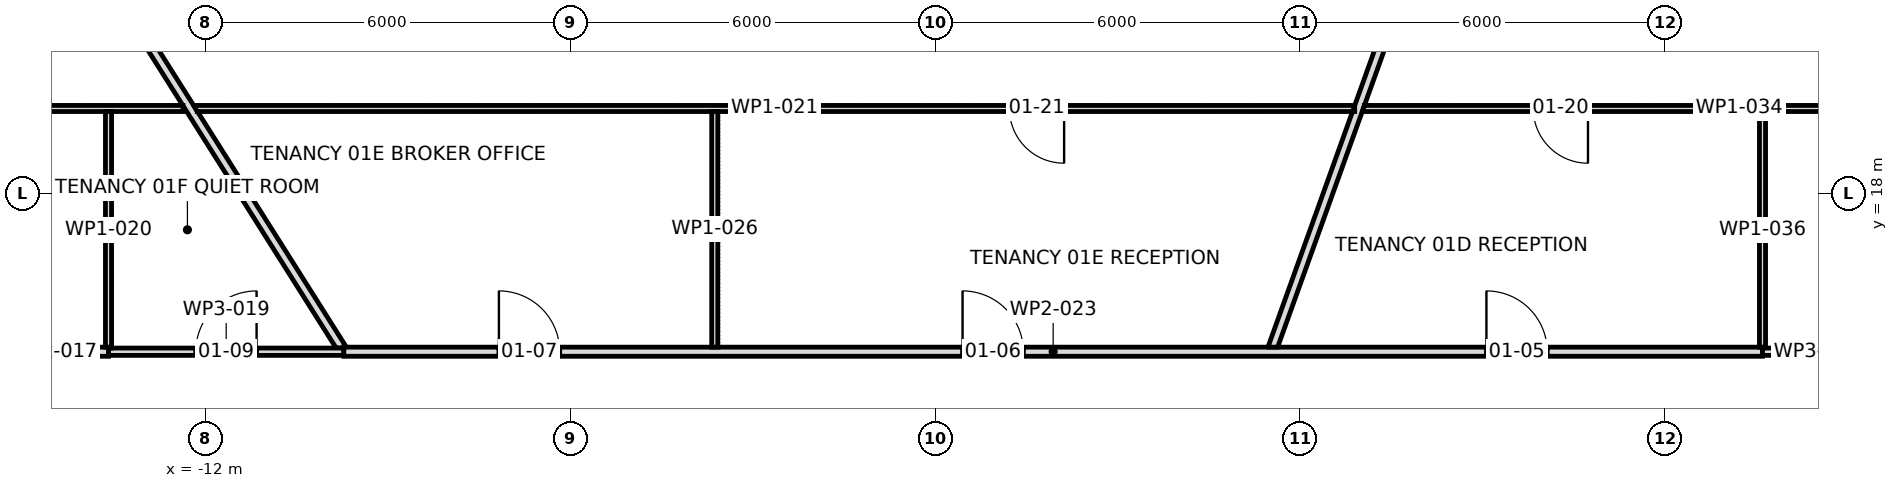
"""IFC4 building model, lengths in metres.
Left out: names, types, materials, properties, quantities, classifications, styles, units other than length and angle.
Written with IfcOpenShell. Run it as: python <this file> out.ifc"""

import sys

from ifc_helpers import new_model, si_unit, direction, frame, frame_2d, origin, place, context, subcontext, project, spatial, polyline, rectangle, outline, extrude, element, fill, save


model = new_model("IFC4")
c1 = context("Model", 3, precision=1e-05, world=origin(), true_north=direction((0.0, 1.0)))
c2 = subcontext(c1, "Body", "Model", "MODEL_VIEW")
j1 = project(units=[si_unit("LENGTHUNIT", "METRE"), si_unit("PLANEANGLEUNIT", "RADIAN")], contexts=[c1])
p1 = place(None, origin())
s1 = spatial("IfcSite", under=j1, at=p1, CompositionType="ELEMENT")
p2 = place(p1, origin())
s2 = spatial("IfcBuilding", under=s1, at=p2, CompositionType="ELEMENT")
p3 = place(p2, frame((0.0, 0.0, 27.7)))
s3 = spatial("IfcBuildingStorey", under=s2, at=p3, CompositionType="ELEMENT", Elevation=27.7)
p4 = place(p3, frame((-19.45, 19.4, 0.0), z_axis=(0.0, 0.0, 1.0), x_axis=(1.0, 0.0, 0.0)))
e1 = element("IfcWall", 1, at=p4, inside=s3, PredefinedType="PARTITIONING", context=c2, shape_type="SweptSolid", body=[
    extrude(outline(polyline([(7.075, 0.05), (5.306, 0.05), (3.538, 0.05), (1.769, 0.05), (0.0, 0.05), (0.1, -0.05), (1.844, -0.05), (3.587, -0.05), (5.331, -0.05), (7.075, -0.05), (7.075, 0.05)])), origin(), (0.0, 0.0, 1.0), 3.9),
])
p5 = place(p3, frame((-16.592, 26.26, 0.0), z_axis=(0.0, 0.0, 1.0), x_axis=(0.534158681269, -0.845384234077, 0.0)))
e2 = element("IfcWall", 2, at=p5, inside=s3, PredefinedType="PARTITIONING", context=c2, shape_type="SweptSolid", body=[
    extrude(outline(polyline([(0.0, -0.075), (1.602, -0.075), (3.204, -0.075), (4.805, -0.075), (6.407, -0.075), (8.009, -0.075), (8.01, -0.073), (8.014, -0.075), (9.585, -0.075), (11.157, -0.075), (12.729, -0.075), (12.782, 0.01), (12.782, 0.01), (12.796, 0.032), (12.783, 0.04), (12.805, 0.075), (12.805, 0.075), (11.278, 0.075), (9.75, 0.075), (8.222, 0.075), (8.22, 0.073), (8.217, 0.075), (6.577, 0.075), (4.938, 0.075), (3.299, 0.075), (1.66, 0.075), (0.021, 0.075), (0.003, -0.003), (0.0, -0.07), (0.0, -0.075)])), origin(), (0.0, 0.0, 1.0), 2.91),
])
p6 = place(p3, frame((-15.475, 15.4, 0.0), z_axis=(0.0, 0.0, 1.0), x_axis=(1.0, 0.0, 0.0)))
e3 = element("IfcWall", 3, at=p6, inside=s3, PredefinedType="PARTITIONING", context=c2, shape_type="SweptSolid", body=[
    extrude(outline(polyline([(1.875, 0.075), (0.0, 0.075), (0.15, -0.075), (1.875, -0.075), (1.875, 0.075)])), origin(), (0.0, 0.0, 1.0), 3.9),
])
p7 = place(p3, frame((-13.6, 15.4, 0.0), z_axis=(0.0, 0.0, 1.0), x_axis=(1.0, 0.0, 0.0)))
e4 = element("IfcWall", 4, at=p7, inside=s3, PredefinedType="PARTITIONING", context=c2, shape_type="SweptSolid", body=[
    extrude(rectangle(XDim=3.87, YDim=0.12, at=frame_2d((1.935, 0.0))), origin(), (0.0, 0.0, 1.0), 3.9),
])
p8 = place(p7, frame((1.435, 0.0, 0.0)))
e5 = element("IfcOpeningElement", 5, at=p8, cuts=e4, PredefinedType="OPENING", context=c2, shape_type="SweptSolid", body=[
    extrude(rectangle(XDim=1.0, YDim=2.1, at=frame_2d((0.5, 1.05))), frame((0.0, 0.072, 0.0), z_axis=(0.0, -1.0, 0.0), x_axis=(1.0, 0.0, 0.0)), (0.0, 0.0, 1.0), 0.144),
])
p9 = place(p3, frame((-13.6, 19.35, 0.0), z_axis=(0.0, 0.0, 1.0), x_axis=(0.0, -1.0, 0.0)))
e6 = element("IfcWall", 6, at=p9, inside=s3, PredefinedType="PARTITIONING", context=c2, shape_type="SweptSolid", body=[
    extrude(outline(polyline([(0.0, -0.05), (1.938, -0.05), (3.875, -0.05), (3.875, 0.0), (3.89, 0.0), (3.89, 0.05), (1.945, 0.05), (0.0, 0.05), (0.0, -0.05)])), origin(), (0.0, 0.0, 1.0), 3.9),
])
p10 = place(p3, frame((-12.2, 19.4, 0.0), z_axis=(0.0, 0.0, 1.0), x_axis=(1.0, 0.0, 0.0)))
e7 = element("IfcWall", 7, at=p10, inside=s3, PredefinedType="PARTITIONING", context=c2, shape_type="SweptSolid", body=[
    extrude(outline(polyline([(0.063, -0.05), (1.754, -0.05), (3.446, -0.05), (5.137, -0.05), (6.829, -0.05), (8.52, -0.05), (8.52, -0.05), (8.62, -0.05), (8.62, -0.05), (10.36, -0.05), (12.099, -0.05), (13.839, -0.05), (15.579, -0.05), (17.319, -0.05), (19.058, -0.05), (19.094, 0.049), (19.094, 0.05), (17.185, 0.05), (15.275, 0.05), (13.366, 0.05), (11.456, 0.05), (9.547, 0.05), (7.638, 0.05), (5.728, 0.05), (3.819, 0.05), (1.909, 0.05), (0.0, 0.05), (0.0, 0.05), (0.063, -0.05)])), origin(), (0.0, 0.0, 1.0), 3.9),
])
p11 = place(p10, frame((13.415, 0.0, 0.0)))
e8 = element("IfcOpeningElement", 8, at=p11, cuts=e7, PredefinedType="OPENING", context=c2, shape_type="SweptSolid", body=[
    extrude(rectangle(XDim=0.9, YDim=2.1, at=frame_2d((0.45, 1.05))), frame((0.0, 0.062, 0.0), z_axis=(0.0, -1.0, 0.0), x_axis=(1.0, 0.0, 0.0)), (0.0, 0.0, 1.0), 0.124),
])
p12 = place(p3, frame((-9.73, 15.4, 0.0), z_axis=(0.0, 0.0, 1.0), x_axis=(1.0, 0.0, 0.0)))
e9 = element("IfcWall", 9, at=p12, inside=s3, PredefinedType="PARTITIONING", context=c2, shape_type="SweptSolid", body=[
    extrude(rectangle(XDim=23.33, YDim=0.15, at=frame_2d((11.665, 0.0))), origin(), (0.0, 0.0, 1.0), 3.9),
])
p13 = place(p12, frame((18.79, 0.0, 0.0)))
e10 = element("IfcOpeningElement", 10, at=p13, cuts=e9, PredefinedType="OPENING", context=c2, shape_type="SweptSolid", body=[
    extrude(rectangle(XDim=1.0, YDim=2.1, at=frame_2d((0.5, 1.05))), frame((0.0, 0.087, 0.0), z_axis=(0.0, -1.0, 0.0), x_axis=(1.0, 0.0, 0.0)), (0.0, 0.0, 1.0), 0.174),
])
p14 = place(p12, frame((10.175, 0.0, 0.0)))
e11 = element("IfcOpeningElement", 11, at=p14, cuts=e9, PredefinedType="OPENING", context=c2, shape_type="SweptSolid", body=[
    extrude(rectangle(XDim=1.0, YDim=2.1, at=frame_2d((0.5, 1.05))), frame((0.0, 0.087, 0.0), z_axis=(0.0, -1.0, 0.0), x_axis=(1.0, 0.0, 0.0)), (0.0, 0.0, 1.0), 0.174),
])
p15 = place(p12, frame((2.55, 0.0, 0.0)))
e12 = element("IfcOpeningElement", 12, at=p15, cuts=e9, PredefinedType="OPENING", context=c2, shape_type="SweptSolid", body=[
    extrude(rectangle(XDim=1.0, YDim=2.1, at=frame_2d((0.5, 1.05))), frame((0.0, 0.087, 0.0), z_axis=(0.0, -1.0, 0.0), x_axis=(1.0, 0.0, 0.0)), (0.0, 0.0, 1.0), 0.174),
])
p16 = place(p3, frame((-3.63, 15.475, 0.0), z_axis=(0.0, 0.0, 1.0), x_axis=(0.0, 1.0, 0.0)))
e13 = element("IfcWall", 13, at=p16, inside=s3, PredefinedType="PARTITIONING", context=c2, shape_type="SweptSolid", body=[
    extrude(rectangle(XDim=3.875, YDim=0.1, at=frame_2d((1.938, 0.0))), origin(), (0.0, 0.0, 1.0), 3.9),
])
p17 = place(p3, frame((5.538, 15.45, 0.0), z_axis=(0.0, 0.0, 1.0), x_axis=(0.337914385466, 0.94117685272, 0.0)))
e14 = element("IfcWall", 14, at=p17, inside=s3, PredefinedType="PARTITIONING", context=c2, shape_type="SweptSolid", body=[
    extrude(outline(polyline([(0.053, -0.075), (1.46, -0.075), (2.867, -0.075), (4.274, -0.075), (4.277, -0.074), (4.277, -0.075), (6.192, -0.075), (8.108, -0.075), (10.023, -0.075), (11.939, -0.075), (13.854, -0.075), (13.854, -0.063), (13.854, 0.001), (13.841, 0.075), (11.917, 0.075), (9.993, 0.075), (8.07, 0.075), (6.146, 0.075), (4.222, 0.075), (4.129, 0.042), (4.117, 0.075), (2.745, 0.075), (1.372, 0.075), (0.0, 0.075), (0.0, 0.074), (0.053, -0.075)])), origin(), (0.0, 0.0, 1.0), 2.91),
])
p18 = place(p3, frame((7.018, 19.4, 0.0), z_axis=(0.0, 0.0, 1.0), x_axis=(1.0, 0.0, 0.0)))
e15 = element("IfcWall", 15, at=p18, inside=s3, PredefinedType="PARTITIONING", context=c2, shape_type="SweptSolid", body=[
    extrude(outline(polyline([(0.0, -0.05), (1.633, -0.05), (3.266, -0.05), (4.899, -0.05), (6.532, -0.05), (6.532, -0.05), (6.632, -0.05), (6.632, -0.05), (8.532, -0.05), (10.432, -0.05), (12.332, -0.05), (12.332, -0.05), (12.432, 0.05), (10.661, 0.05), (8.89, 0.05), (7.119, 0.05), (5.348, 0.05), (3.577, 0.05), (1.807, 0.05), (0.036, 0.05), (0.0, -0.049), (0.0, -0.05)])), origin(), (0.0, 0.0, 1.0), 3.9),
])
p19 = place(p18, frame((2.812, 0.0, 0.0)))
e16 = element("IfcOpeningElement", 16, at=p19, cuts=e15, PredefinedType="OPENING", context=c2, shape_type="SweptSolid", body=[
    extrude(rectangle(XDim=0.9, YDim=2.1, at=frame_2d((0.45, 1.05))), frame((0.0, 0.062, 0.0), z_axis=(0.0, -1.0, 0.0), x_axis=(1.0, 0.0, 0.0)), (0.0, 0.0, 1.0), 0.124),
])
p20 = place(p3, frame((13.6, 15.46, 0.0), z_axis=(0.0, 0.0, 1.0), x_axis=(0.0, 1.0, 0.0)))
e17 = element("IfcWall", 17, at=p20, inside=s3, PredefinedType="PARTITIONING", context=c2, shape_type="SweptSolid", body=[
    extrude(outline(polyline([(0.0, -0.05), (1.945, -0.05), (3.89, -0.05), (3.89, 0.05), (1.952, 0.05), (0.015, 0.05), (0.015, 0.0), (0.0, 0.0), (0.0, -0.05)])), origin(), (0.0, 0.0, 1.0), 3.9),
])
p21 = place(p3, frame((13.6, 15.4, 0.0), z_axis=(0.0, 0.0, 1.0), x_axis=(1.0, 0.0, 0.0)))
e18 = element("IfcWall", 18, at=p21, inside=s3, PredefinedType="PARTITIONING", context=c2, shape_type="SweptSolid", body=[
    extrude(outline(polyline([(0.0, -0.06), (1.74, -0.06), (1.86, 0.06), (0.0, 0.06), (0.0, -0.06)])), origin(), (0.0, 0.0, 1.0), 3.9),
])
p22 = place(p13, origin())
e19 = element("IfcDoor", 19, at=p22, inside=s3, OperationType="SINGLE_SWING_RIGHT", PredefinedType="DOOR", context=c2, shape_type="SweptSolid", body=[
    extrude(rectangle(XDim=1.0, YDim=2.1, at=frame_2d((0.5, 1.05))), frame((0.0, 0.025, 0.0), z_axis=(0.0, -1.0, 0.0), x_axis=(1.0, 0.0, 0.0)), (0.0, 0.0, 1.0), 0.05),
])
fill(e10, e19)
p23 = place(p14, origin())
e20 = element("IfcDoor", 20, at=p23, inside=s3, OperationType="SINGLE_SWING_RIGHT", PredefinedType="DOOR", context=c2, shape_type="SweptSolid", body=[
    extrude(rectangle(XDim=1.0, YDim=2.1, at=frame_2d((0.5, 1.05))), frame((0.0, 0.025, 0.0), z_axis=(0.0, -1.0, 0.0), x_axis=(1.0, 0.0, 0.0)), (0.0, 0.0, 1.0), 0.05),
])
fill(e11, e20)
p24 = place(p15, origin())
e21 = element("IfcDoor", 21, at=p24, inside=s3, OperationType="SINGLE_SWING_RIGHT", PredefinedType="DOOR", context=c2, shape_type="SweptSolid", body=[
    extrude(rectangle(XDim=1.0, YDim=2.1, at=frame_2d((0.5, 1.05))), frame((0.0, 0.025, 0.0), z_axis=(0.0, -1.0, 0.0), x_axis=(1.0, 0.0, 0.0)), (0.0, 0.0, 1.0), 0.05),
])
fill(e12, e21)
p25 = place(p8, origin())
e22 = element("IfcDoor", 22, at=p25, inside=s3, OperationType="SINGLE_SWING_LEFT", PredefinedType="DOOR", context=c2, shape_type="SweptSolid", body=[
    extrude(rectangle(XDim=1.0, YDim=2.1, at=frame_2d((0.5, 1.05))), frame((0.0, 0.025, 0.0), z_axis=(0.0, -1.0, 0.0), x_axis=(1.0, 0.0, 0.0)), (0.0, 0.0, 1.0), 0.05),
])
fill(e5, e22)
p26 = place(p19, frame((0.9, 0.0, 0.0), z_axis=(0.0, 0.0, 1.0), x_axis=(-1.0, 0.0, 0.0)))
e23 = element("IfcDoor", 23, at=p26, inside=s3, OperationType="SINGLE_SWING_RIGHT", PredefinedType="DOOR", context=c2, shape_type="SweptSolid", body=[
    extrude(rectangle(XDim=0.9, YDim=2.1, at=frame_2d((0.45, 1.05))), frame((0.0, 0.025, 0.0), z_axis=(0.0, -1.0, 0.0), x_axis=(1.0, 0.0, 0.0)), (0.0, 0.0, 1.0), 0.05),
])
fill(e16, e23)
p27 = place(p11, frame((0.9, 0.0, 0.0), z_axis=(0.0, 0.0, 1.0), x_axis=(-1.0, 0.0, 0.0)))
e24 = element("IfcDoor", 24, at=p27, inside=s3, OperationType="SINGLE_SWING_RIGHT", PredefinedType="DOOR", context=c2, shape_type="SweptSolid", body=[
    extrude(rectangle(XDim=0.9, YDim=2.1, at=frame_2d((0.45, 1.05))), frame((0.0, 0.025, 0.0), z_axis=(0.0, -1.0, 0.0), x_axis=(1.0, 0.0, 0.0)), (0.0, 0.0, 1.0), 0.05),
])
fill(e8, e24)
save(model, sys.argv[1])
